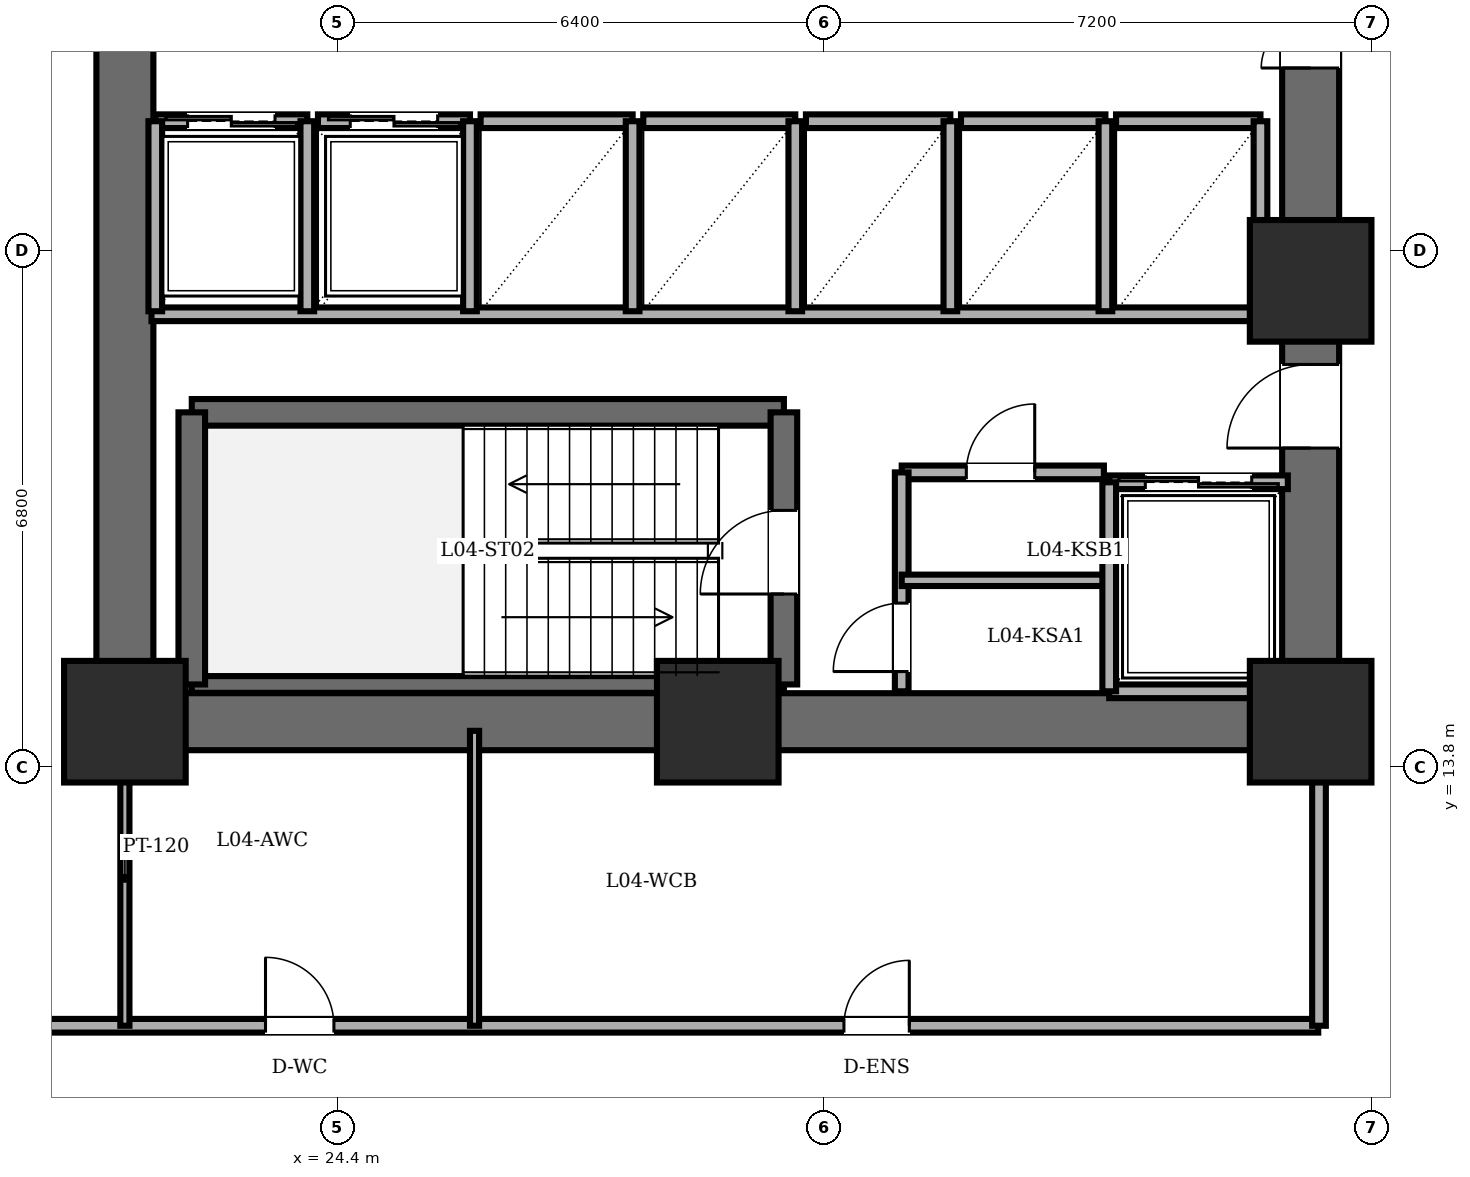
"""IFC4 building model, lengths in metres.
Left out: names, types, materials, properties, quantities, classifications, styles, units other than length and angle.
Written with IfcOpenShell. Run it as: python <this file> out.ifc"""

import sys

from ifc_helpers import new_model, si_unit, direction, frame, frame_2d, origin, origin_2d, place, context, subcontext, project, spatial, rectangle, extrude, element, fill, save


model = new_model("IFC4")
c1 = context("Model", 3, precision=1e-05, world=origin(), true_north=direction((0.0, 1.0)))
c2 = subcontext(c1, "Body", "Model", "MODEL_VIEW")
j1 = project(units=[si_unit("LENGTHUNIT", "METRE"), si_unit("PLANEANGLEUNIT", "RADIAN")], contexts=[c1])
p1 = place(None, origin())
s1 = spatial("IfcSite", under=j1, at=p1, CompositionType="ELEMENT")
p2 = place(p1, origin())
s2 = spatial("IfcBuilding", under=s1, at=p2, CompositionType="ELEMENT")
p3 = place(p2, frame((0.0, 0.0, 14.7)))
s3 = spatial("IfcBuildingStorey", under=s2, at=p3, CompositionType="ELEMENT", Elevation=14.7)
for number, where, z_axis, x_axis in (
    (1, (21.6, 14.4, 0.0), (0.0, 0.0, 1.0), (1.0, 0.0, 0.0)),
    (2, (29.4, 14.4, 0.0), (0.0, 0.0, 1.0), (1.0, 0.0, 0.0)),
    (3, (37.2, 14.4, 0.0), (0.0, 0.0, 1.0), (1.0, 0.0, 0.0)),
    (4, (37.2, 20.2, 0.0), (0.0, 0.0, 1.0), (1.0, 0.0, 0.0)),
):
    element("IfcColumn", number, at=place(p3, frame(where, z_axis=z_axis, x_axis=x_axis)), inside=s3, PredefinedType="COLUMN", context=c2, shape_type="SweptSolid", body=[
        extrude(rectangle(XDim=1.6, YDim=1.6, at=origin_2d()), origin(), (0.0, 0.0, 1.0), 4.65),
    ])
p4 = place(p3, frame((21.6, 14.4, 0.0), z_axis=(0.0, 0.0, 1.0), x_axis=(0.0, 1.0, 0.0)))
e5 = element("IfcWall", 5, at=p4, inside=s3, PredefinedType="SHEAR", context=c2, shape_type="SweptSolid", body=[
    extrude(rectangle(XDim=19.2, YDim=0.75, at=frame_2d((9.6, 0.0))), origin(), (0.0, 0.0, 1.0), 4.45),
])
p5 = place(p3, frame((37.2, 14.4, 0.0), z_axis=(0.0, 0.0, 1.0), x_axis=(-1.0, 0.0, 0.0)))
e6 = element("IfcWall", 6, at=p5, inside=s3, PredefinedType="SHEAR", context=c2, shape_type="SweptSolid", body=[
    extrude(rectangle(XDim=15.6, YDim=0.75, at=frame_2d((7.8, 0.0))), origin(), (0.0, 0.0, 1.0), 4.45),
])
p6 = place(p3, frame((37.2, 14.4, 0.0), z_axis=(0.0, 0.0, 1.0), x_axis=(0.0, 1.0, 0.0)))
e7 = element("IfcWall", 7, at=p6, inside=s3, PredefinedType="SHEAR", context=c2, shape_type="SweptSolid", body=[
    extrude(rectangle(XDim=19.2, YDim=0.75, at=frame_2d((9.6, 0.0))), origin(), (0.0, 0.0, 1.0), 4.45),
])
p7 = place(p6, frame((15.8, 0.0, 0.0)))
e8 = element("IfcOpeningElement", 8, at=p7, cuts=e7, PredefinedType="OPENING", context=c2, shape_type="SweptSolid", body=[
    extrude(rectangle(XDim=1.15, YDim=2.15, at=frame_2d((0.575, 1.075))), frame((0.0, 0.385, 0.0), z_axis=(0.0, -1.0, 0.0), x_axis=(1.0, 0.0, 0.0)), (0.0, 0.0, 1.0), 0.77),
])
p8 = place(p6, frame((3.6, 0.0, 0.0)))
e9 = element("IfcOpeningElement", 9, at=p8, cuts=e7, PredefinedType="OPENING", context=c2, shape_type="SweptSolid", body=[
    extrude(rectangle(XDim=1.1, YDim=2.15, at=frame_2d((0.55, 1.075))), frame((0.0, 0.385, 0.0), z_axis=(0.0, -1.0, 0.0), x_axis=(1.0, 0.0, 0.0)), (0.0, 0.0, 1.0), 0.77),
])
p9 = place(p6, frame((8.6, 0.0, 0.0)))
e10 = element("IfcOpeningElement", 10, at=p9, cuts=e7, PredefinedType="OPENING", context=c2, shape_type="SweptSolid", body=[
    extrude(rectangle(XDim=1.3, YDim=2.2, at=frame_2d((0.65, 1.1))), frame((0.0, 0.385, 0.0), z_axis=(0.0, -1.0, 0.0), x_axis=(1.0, 0.0, 0.0)), (0.0, 0.0, 1.0), 0.77),
])
p10 = place(p3, frame((22.48, 18.47, 0.0), z_axis=(0.0, 0.0, 1.0), x_axis=(1.0, 0.0, 0.0)))
e11 = element("IfcWall", 11, at=p10, inside=s3, PredefinedType="SOLIDWALL", context=c2, shape_type="SweptSolid", body=[
    extrude(rectangle(XDim=7.79, YDim=0.35, at=frame_2d((3.895, 0.0))), origin(), (0.0, 0.0, 1.0), 4.45),
])
p11 = place(p3, frame((22.48, 14.89, 0.0), z_axis=(0.0, 0.0, 1.0), x_axis=(1.0, 0.0, 0.0)))
e12 = element("IfcWall", 12, at=p11, inside=s3, PredefinedType="PARTITIONING", context=c2, shape_type="SweptSolid", body=[
    extrude(rectangle(XDim=7.79, YDim=0.22, at=frame_2d((3.895, 0.0))), origin(), (0.0, 0.0, 1.0), 4.45),
])
p12 = place(p3, frame((22.48, 14.89, 0.0), z_axis=(0.0, 0.0, 1.0), x_axis=(0.0, 1.0, 0.0)))
e13 = element("IfcWall", 13, at=p12, inside=s3, PredefinedType="SOLIDWALL", context=c2, shape_type="SweptSolid", body=[
    extrude(rectangle(XDim=3.58, YDim=0.35, at=frame_2d((1.79, 0.0))), origin(), (0.0, 0.0, 1.0), 4.45),
])
p13 = place(p3, frame((30.27, 14.89, 0.0), z_axis=(0.0, 0.0, 1.0), x_axis=(0.0, 1.0, 0.0)))
e14 = element("IfcWall", 14, at=p13, inside=s3, PredefinedType="SOLIDWALL", context=c2, shape_type="SweptSolid", body=[
    extrude(rectangle(XDim=3.58, YDim=0.35, at=frame_2d((1.79, 0.0))), origin(), (0.0, 0.0, 1.0), 4.45),
])
p14 = place(p13, frame((1.19, 0.0, 0.0)))
e15 = element("IfcOpeningElement", 15, at=p14, cuts=e14, PredefinedType="OPENING", context=c2, shape_type="SweptSolid", body=[
    extrude(rectangle(XDim=1.1, YDim=2.15, at=frame_2d((0.55, 1.075))), frame((0.0, 0.185, 0.0), z_axis=(0.0, -1.0, 0.0), x_axis=(1.0, 0.0, 0.0)), (0.0, 0.0, 1.0), 0.37),
])
p15 = place(p3, frame((21.95, 19.76, 0.0), z_axis=(0.0, 0.0, 1.0), x_axis=(1.0, 0.0, 0.0)))
e16 = element("IfcWall", 16, at=p15, inside=s3, PredefinedType="PARTITIONING", context=c2, shape_type="SweptSolid", body=[
    extrude(rectangle(XDim=14.87, YDim=0.18, at=frame_2d((7.435, 0.0))), origin(), (0.0, 0.0, 1.0), 4.45),
])
p16 = place(p3, frame((31.82, 17.68, 0.0), z_axis=(0.0, 0.0, 1.0), x_axis=(1.0, 0.0, 0.0)))
e17 = element("IfcWall", 17, at=p16, inside=s3, PredefinedType="PARTITIONING", context=c2, shape_type="SweptSolid", body=[
    extrude(rectangle(XDim=2.66, YDim=0.18, at=frame_2d((1.33, 0.0))), origin(), (0.0, 0.0, 1.0), 4.45),
])
p17 = place(p16, frame((0.85, 0.0, 0.0)))
e18 = element("IfcOpeningElement", 18, at=p17, cuts=e17, PredefinedType="OPENING", context=c2, shape_type="SweptSolid", body=[
    extrude(rectangle(XDim=0.9, YDim=2.05, at=frame_2d((0.45, 1.025))), frame((0.0, 0.1, 0.0), z_axis=(0.0, -1.0, 0.0), x_axis=(1.0, 0.0, 0.0)), (0.0, 0.0, 1.0), 0.2),
])
p18 = place(p3, frame((31.82, 14.8, 0.0), z_axis=(0.0, 0.0, 1.0), x_axis=(0.0, 1.0, 0.0)))
e19 = element("IfcWall", 19, at=p18, inside=s3, PredefinedType="PARTITIONING", context=c2, shape_type="SweptSolid", body=[
    extrude(rectangle(XDim=2.88, YDim=0.18, at=frame_2d((1.44, 0.0))), origin(), (0.0, 0.0, 1.0), 4.45),
])
p19 = place(p18, frame((0.26, 0.0, 0.0)))
e20 = element("IfcOpeningElement", 20, at=p19, cuts=e19, PredefinedType="OPENING", context=c2, shape_type="SweptSolid", body=[
    extrude(rectangle(XDim=0.9, YDim=2.05, at=frame_2d((0.45, 1.025))), frame((0.0, 0.1, 0.0), z_axis=(0.0, -1.0, 0.0), x_axis=(1.0, 0.0, 0.0)), (0.0, 0.0, 1.0), 0.2),
])
p20 = place(p3, frame((31.82, 16.26, 0.0), z_axis=(0.0, 0.0, 1.0), x_axis=(1.0, 0.0, 0.0)))
e21 = element("IfcWall", 21, at=p20, inside=s3, PredefinedType="PARTITIONING", context=c2, shape_type="SweptSolid", body=[
    extrude(rectangle(XDim=2.66, YDim=0.15, at=frame_2d((1.33, 0.0))), origin(), (0.0, 0.0, 1.0), 4.45),
])
p21 = place(p3, frame((34.55, 17.55, 0.0), z_axis=(0.0, 0.0, 1.0), x_axis=(1.0, 0.0, 0.0)))
e22 = element("IfcWall", 22, at=p21, inside=s3, PredefinedType="PARTITIONING", context=c2, shape_type="SweptSolid", body=[
    extrude(rectangle(XDim=2.35, YDim=0.18, at=frame_2d((1.175, 0.0))), origin(), (0.0, 0.0, 1.0), 4.45),
])
p22 = place(p21, frame((0.475, 0.0, 0.0)))
e23 = element("IfcOpeningElement", 23, at=p22, cuts=e22, PredefinedType="OPENING", context=c2, shape_type="SweptSolid", body=[
    extrude(rectangle(XDim=1.4, YDim=2.3, at=frame_2d((0.7, 1.15))), frame((0.0, 0.1, 0.0), z_axis=(0.0, -1.0, 0.0), x_axis=(1.0, 0.0, 0.0)), (0.0, 0.0, 1.0), 0.2),
])
p23 = place(p3, frame((36.9, 14.8, 0.0), z_axis=(0.0, 0.0, 1.0), x_axis=(-1.0, 0.0, 0.0)))
e24 = element("IfcWall", 24, at=p23, inside=s3, PredefinedType="PARTITIONING", context=c2, shape_type="SweptSolid", body=[
    extrude(rectangle(XDim=2.35, YDim=0.18, at=frame_2d((1.175, 0.0))), origin(), (0.0, 0.0, 1.0), 4.45),
])
p24 = place(p3, frame((34.55, 17.55, 0.0), z_axis=(0.0, 0.0, 1.0), x_axis=(0.0, -1.0, 0.0)))
e25 = element("IfcWall", 25, at=p24, inside=s3, PredefinedType="PARTITIONING", context=c2, shape_type="SweptSolid", body=[
    extrude(rectangle(XDim=2.75, YDim=0.18, at=frame_2d((1.375, 0.0))), origin(), (0.0, 0.0, 1.0), 4.45),
])
p25 = place(p3, frame((22.0, 22.3, 0.0), z_axis=(0.0, 0.0, 1.0), x_axis=(1.0, 0.0, 0.0)))
e26 = element("IfcWall", 26, at=p25, inside=s3, PredefinedType="PARTITIONING", context=c2, shape_type="SweptSolid", body=[
    extrude(rectangle(XDim=2.0, YDim=0.18, at=frame_2d((1.0, 0.0))), origin(), (0.0, 0.0, 1.0), 4.45),
])
p26 = place(p25, frame((0.425, 0.0, 0.0)))
e27 = element("IfcOpeningElement", 27, at=p26, cuts=e26, PredefinedType="OPENING", context=c2, shape_type="SweptSolid", body=[
    extrude(rectangle(XDim=1.15, YDim=2.2, at=frame_2d((0.575, 1.1))), frame((0.0, 0.1, 0.0), z_axis=(0.0, -1.0, 0.0), x_axis=(1.0, 0.0, 0.0)), (0.0, 0.0, 1.0), 0.2),
])
for number, where, z_axis, x_axis in (
    (28, (24.0, 19.8, 0.0), (0.0, 0.0, 1.0), (0.0, 1.0, 0.0)),
    (29, (22.0, 22.3, 0.0), (0.0, 0.0, 1.0), (0.0, -1.0, 0.0)),
):
    element("IfcWall", number, at=place(p3, frame(where, z_axis=z_axis, x_axis=x_axis)), inside=s3, PredefinedType="PARTITIONING", context=c2, shape_type="SweptSolid", body=[
        extrude(rectangle(XDim=2.5, YDim=0.18, at=frame_2d((1.25, 0.0))), origin(), (0.0, 0.0, 1.0), 4.45),
    ])
p27 = place(p3, frame((24.14, 22.3, 0.0), z_axis=(0.0, 0.0, 1.0), x_axis=(1.0, 0.0, 0.0)))
e30 = element("IfcWall", 30, at=p27, inside=s3, PredefinedType="PARTITIONING", context=c2, shape_type="SweptSolid", body=[
    extrude(rectangle(XDim=2.0, YDim=0.18, at=frame_2d((1.0, 0.0))), origin(), (0.0, 0.0, 1.0), 4.45),
])
p28 = place(p27, frame((0.425, 0.0, 0.0)))
e31 = element("IfcOpeningElement", 31, at=p28, cuts=e30, PredefinedType="OPENING", context=c2, shape_type="SweptSolid", body=[
    extrude(rectangle(XDim=1.15, YDim=2.2, at=frame_2d((0.575, 1.1))), frame((0.0, 0.1, 0.0), z_axis=(0.0, -1.0, 0.0), x_axis=(1.0, 0.0, 0.0)), (0.0, 0.0, 1.0), 0.2),
])
p29 = place(p3, frame((26.14, 19.8, 0.0), z_axis=(0.0, 0.0, 1.0), x_axis=(0.0, 1.0, 0.0)))
e32 = element("IfcWall", 32, at=p29, inside=s3, PredefinedType="PARTITIONING", context=c2, shape_type="SweptSolid", body=[
    extrude(rectangle(XDim=2.5, YDim=0.18, at=frame_2d((1.25, 0.0))), origin(), (0.0, 0.0, 1.0), 4.45),
])
p30 = place(p3, frame((26.28, 22.3, 0.0), z_axis=(0.0, 0.0, 1.0), x_axis=(1.0, 0.0, 0.0)))
e33 = element("IfcWall", 33, at=p30, inside=s3, PredefinedType="PARTITIONING", context=c2, shape_type="SweptSolid", body=[
    extrude(rectangle(XDim=2.0, YDim=0.18, at=frame_2d((1.0, 0.0))), origin(), (0.0, 0.0, 1.0), 4.45),
])
p31 = place(p3, frame((28.28, 19.8, 0.0), z_axis=(0.0, 0.0, 1.0), x_axis=(0.0, 1.0, 0.0)))
e34 = element("IfcWall", 34, at=p31, inside=s3, PredefinedType="PARTITIONING", context=c2, shape_type="SweptSolid", body=[
    extrude(rectangle(XDim=2.5, YDim=0.18, at=frame_2d((1.25, 0.0))), origin(), (0.0, 0.0, 1.0), 4.45),
])
p32 = place(p3, frame((28.42, 22.3, 0.0), z_axis=(0.0, 0.0, 1.0), x_axis=(1.0, 0.0, 0.0)))
e35 = element("IfcWall", 35, at=p32, inside=s3, PredefinedType="PARTITIONING", context=c2, shape_type="SweptSolid", body=[
    extrude(rectangle(XDim=2.0, YDim=0.18, at=frame_2d((1.0, 0.0))), origin(), (0.0, 0.0, 1.0), 4.45),
])
p33 = place(p3, frame((30.42, 19.8, 0.0), z_axis=(0.0, 0.0, 1.0), x_axis=(0.0, 1.0, 0.0)))
e36 = element("IfcWall", 36, at=p33, inside=s3, PredefinedType="PARTITIONING", context=c2, shape_type="SweptSolid", body=[
    extrude(rectangle(XDim=2.5, YDim=0.18, at=frame_2d((1.25, 0.0))), origin(), (0.0, 0.0, 1.0), 4.45),
])
p34 = place(p3, frame((30.56, 22.3, 0.0), z_axis=(0.0, 0.0, 1.0), x_axis=(1.0, 0.0, 0.0)))
e37 = element("IfcWall", 37, at=p34, inside=s3, PredefinedType="PARTITIONING", context=c2, shape_type="SweptSolid", body=[
    extrude(rectangle(XDim=1.9, YDim=0.18, at=frame_2d((0.95, 0.0))), origin(), (0.0, 0.0, 1.0), 4.45),
])
p35 = place(p3, frame((32.46, 19.8, 0.0), z_axis=(0.0, 0.0, 1.0), x_axis=(0.0, 1.0, 0.0)))
e38 = element("IfcWall", 38, at=p35, inside=s3, PredefinedType="PARTITIONING", context=c2, shape_type="SweptSolid", body=[
    extrude(rectangle(XDim=2.5, YDim=0.18, at=frame_2d((1.25, 0.0))), origin(), (0.0, 0.0, 1.0), 4.45),
])
p36 = place(p3, frame((32.6, 22.3, 0.0), z_axis=(0.0, 0.0, 1.0), x_axis=(1.0, 0.0, 0.0)))
e39 = element("IfcWall", 39, at=p36, inside=s3, PredefinedType="PARTITIONING", context=c2, shape_type="SweptSolid", body=[
    extrude(rectangle(XDim=1.9, YDim=0.18, at=frame_2d((0.95, 0.0))), origin(), (0.0, 0.0, 1.0), 4.45),
])
p37 = place(p3, frame((34.5, 19.8, 0.0), z_axis=(0.0, 0.0, 1.0), x_axis=(0.0, 1.0, 0.0)))
e40 = element("IfcWall", 40, at=p37, inside=s3, PredefinedType="PARTITIONING", context=c2, shape_type="SweptSolid", body=[
    extrude(rectangle(XDim=2.5, YDim=0.18, at=frame_2d((1.25, 0.0))), origin(), (0.0, 0.0, 1.0), 4.45),
])
p38 = place(p3, frame((34.64, 22.3, 0.0), z_axis=(0.0, 0.0, 1.0), x_axis=(1.0, 0.0, 0.0)))
e41 = element("IfcWall", 41, at=p38, inside=s3, PredefinedType="PARTITIONING", context=c2, shape_type="SweptSolid", body=[
    extrude(rectangle(XDim=1.9, YDim=0.18, at=frame_2d((0.95, 0.0))), origin(), (0.0, 0.0, 1.0), 4.45),
])
p39 = place(p3, frame((36.54, 19.8, 0.0), z_axis=(0.0, 0.0, 1.0), x_axis=(0.0, 1.0, 0.0)))
e42 = element("IfcWall", 42, at=p39, inside=s3, PredefinedType="PARTITIONING", context=c2, shape_type="SweptSolid", body=[
    extrude(rectangle(XDim=2.5, YDim=0.18, at=frame_2d((1.25, 0.0))), origin(), (0.0, 0.0, 1.0), 4.45),
])
p40 = place(p3, frame((17.85, 10.4, 0.0), z_axis=(0.0, 0.0, 1.0), x_axis=(1.0, 0.0, 0.0)))
e43 = element("IfcWall", 43, at=p40, inside=s3, PredefinedType="PARTITIONING", context=c2, shape_type="SweptSolid", body=[
    extrude(rectangle(XDim=19.45, YDim=0.18, at=frame_2d((9.725, 0.0))), origin(), (0.0, 0.0, 1.0), 4.45),
])
p41 = place(p40, frame((1.575, 0.0, 0.0)))
e44 = element("IfcOpeningElement", 44, at=p41, cuts=e43, PredefinedType="OPENING", context=c2, shape_type="SweptSolid", body=[
    extrude(rectangle(XDim=0.92, YDim=2.1, at=frame_2d((0.46, 1.05))), frame((0.0, 0.1, 0.0), z_axis=(0.0, -1.0, 0.0), x_axis=(1.0, 0.0, 0.0)), (0.0, 0.0, 1.0), 0.2),
])
p42 = place(p40, frame((5.6, 0.0, 0.0)))
e45 = element("IfcOpeningElement", 45, at=p42, cuts=e43, PredefinedType="OPENING", context=c2, shape_type="SweptSolid", body=[
    extrude(rectangle(XDim=0.9, YDim=2.1, at=frame_2d((0.45, 1.05))), frame((0.0, 0.1, 0.0), z_axis=(0.0, -1.0, 0.0), x_axis=(1.0, 0.0, 0.0)), (0.0, 0.0, 1.0), 0.2),
])
p43 = place(p40, frame((13.21, 0.0, 0.0)))
e46 = element("IfcOpeningElement", 46, at=p43, cuts=e43, PredefinedType="OPENING", context=c2, shape_type="SweptSolid", body=[
    extrude(rectangle(XDim=0.86, YDim=2.1, at=frame_2d((0.43, 1.05))), frame((0.0, 0.1, 0.0), z_axis=(0.0, -1.0, 0.0), x_axis=(1.0, 0.0, 0.0)), (0.0, 0.0, 1.0), 0.2),
])
p44 = place(p3, frame((21.6, 10.4, 0.0), z_axis=(0.0, 0.0, 1.0), x_axis=(0.0, 1.0, 0.0)))
e47 = element("IfcWall", 47, at=p44, inside=s3, PredefinedType="PARTITIONING", context=c2, shape_type="SweptSolid", body=[
    extrude(rectangle(XDim=3.88, YDim=0.12, at=frame_2d((1.94, 0.0))), origin(), (0.0, 0.0, 1.0), 3.632),
])
p45 = place(p3, frame((26.2, 10.4, 0.0), z_axis=(0.0, 0.0, 1.0), x_axis=(0.0, 1.0, 0.0)))
e48 = element("IfcWall", 48, at=p45, inside=s3, PredefinedType="PARTITIONING", context=c2, shape_type="SweptSolid", body=[
    extrude(rectangle(XDim=3.88, YDim=0.12, at=frame_2d((1.94, 0.0))), origin(), (0.0, 0.0, 1.0), 4.45),
])
p46 = place(p3, frame((37.31, 10.4, 0.0), z_axis=(0.0, 0.0, 1.0), x_axis=(0.0, 1.0, 0.0)))
e49 = element("IfcWall", 49, at=p46, inside=s3, PredefinedType="PARTITIONING", context=c2, shape_type="SweptSolid", body=[
    extrude(rectangle(XDim=3.88, YDim=0.18, at=frame_2d((1.94, 0.0))), origin(), (0.0, 0.0, 1.0), 3.632),
])
p47 = place(p14, origin())
e50 = element("IfcDoor", 50, at=p47, inside=s3, OperationType="SINGLE_SWING_LEFT", PredefinedType="DOOR", context=c2, shape_type="SweptSolid", body=[
    extrude(rectangle(XDim=1.1, YDim=2.15, at=frame_2d((0.55, 1.075))), frame((0.0, 0.025, 0.0), z_axis=(0.0, -1.0, 0.0), x_axis=(1.0, 0.0, 0.0)), (0.0, 0.0, 1.0), 0.05),
])
fill(e15, e50)
p48 = place(p8, origin())
e51 = element("IfcDoor", 51, at=p48, inside=s3, OperationType="SINGLE_SWING_LEFT", PredefinedType="DOOR", context=c2, shape_type="SweptSolid", body=[
    extrude(rectangle(XDim=1.1, YDim=2.15, at=frame_2d((0.55, 1.075))), frame((0.0, 0.025, 0.0), z_axis=(0.0, -1.0, 0.0), x_axis=(1.0, 0.0, 0.0)), (0.0, 0.0, 1.0), 0.05),
])
fill(e9, e51)
p49 = place(p17, origin())
e52 = element("IfcDoor", 52, at=p49, inside=s3, OperationType="SINGLE_SWING_RIGHT", PredefinedType="DOOR", context=c2, shape_type="SweptSolid", body=[
    extrude(rectangle(XDim=0.9, YDim=2.05, at=frame_2d((0.45, 1.025))), frame((0.0, 0.025, 0.0), z_axis=(0.0, -1.0, 0.0), x_axis=(1.0, 0.0, 0.0)), (0.0, 0.0, 1.0), 0.05),
])
fill(e18, e52)
p50 = place(p19, origin())
e53 = element("IfcDoor", 53, at=p50, inside=s3, OperationType="SINGLE_SWING_LEFT", PredefinedType="DOOR", context=c2, shape_type="SweptSolid", body=[
    extrude(rectangle(XDim=0.9, YDim=2.05, at=frame_2d((0.45, 1.025))), frame((0.0, 0.025, 0.0), z_axis=(0.0, -1.0, 0.0), x_axis=(1.0, 0.0, 0.0)), (0.0, 0.0, 1.0), 0.05),
])
fill(e20, e53)
p51 = place(p22, origin())
e54 = element("IfcDoor", 54, at=p51, inside=s3, OperationType="DOUBLE_DOOR_SLIDING", PredefinedType="DOOR", context=c2, shape_type="SweptSolid", body=[
    extrude(rectangle(XDim=1.4, YDim=2.3, at=frame_2d((0.7, 1.15))), frame((0.0, 0.025, 0.0), z_axis=(0.0, -1.0, 0.0), x_axis=(1.0, 0.0, 0.0)), (0.0, 0.0, 1.0), 0.05),
])
fill(e23, e54)
p52 = place(p26, origin())
e55 = element("IfcDoor", 55, at=p52, inside=s3, OperationType="DOUBLE_DOOR_SLIDING", PredefinedType="DOOR", context=c2, shape_type="SweptSolid", body=[
    extrude(rectangle(XDim=1.15, YDim=2.2, at=frame_2d((0.575, 1.1))), frame((0.0, 0.025, 0.0), z_axis=(0.0, -1.0, 0.0), x_axis=(1.0, 0.0, 0.0)), (0.0, 0.0, 1.0), 0.05),
])
fill(e27, e55)
p53 = place(p28, origin())
e56 = element("IfcDoor", 56, at=p53, inside=s3, OperationType="DOUBLE_DOOR_SLIDING", PredefinedType="DOOR", context=c2, shape_type="SweptSolid", body=[
    extrude(rectangle(XDim=1.15, YDim=2.2, at=frame_2d((0.575, 1.1))), frame((0.0, 0.025, 0.0), z_axis=(0.0, -1.0, 0.0), x_axis=(1.0, 0.0, 0.0)), (0.0, 0.0, 1.0), 0.05),
])
fill(e31, e56)
p54 = place(p9, origin())
e57 = element("IfcDoor", 57, at=p54, inside=s3, OperationType="DOUBLE_DOOR_SINGLE_SWING", PredefinedType="DOOR", context=c2, shape_type="SweptSolid", body=[
    extrude(rectangle(XDim=1.3, YDim=2.2, at=frame_2d((0.65, 1.1))), frame((0.0, 0.025, 0.0), z_axis=(0.0, -1.0, 0.0), x_axis=(1.0, 0.0, 0.0)), (0.0, 0.0, 1.0), 0.05),
])
fill(e10, e57)
p55 = place(p42, origin())
e58 = element("IfcDoor", 58, at=p55, inside=s3, OperationType="SINGLE_SWING_LEFT", PredefinedType="DOOR", context=c2, shape_type="SweptSolid", body=[
    extrude(rectangle(XDim=0.9, YDim=2.1, at=frame_2d((0.45, 1.05))), frame((0.0, 0.025, 0.0), z_axis=(0.0, -1.0, 0.0), x_axis=(1.0, 0.0, 0.0)), (0.0, 0.0, 1.0), 0.05),
])
fill(e45, e58)
p56 = place(p43, origin())
e59 = element("IfcDoor", 59, at=p56, inside=s3, OperationType="SINGLE_SWING_RIGHT", PredefinedType="DOOR", context=c2, shape_type="SweptSolid", body=[
    extrude(rectangle(XDim=0.86, YDim=2.1, at=frame_2d((0.43, 1.05))), frame((0.0, 0.025, 0.0), z_axis=(0.0, -1.0, 0.0), x_axis=(1.0, 0.0, 0.0)), (0.0, 0.0, 1.0), 0.05),
])
fill(e46, e59)
save(model, sys.argv[1])
